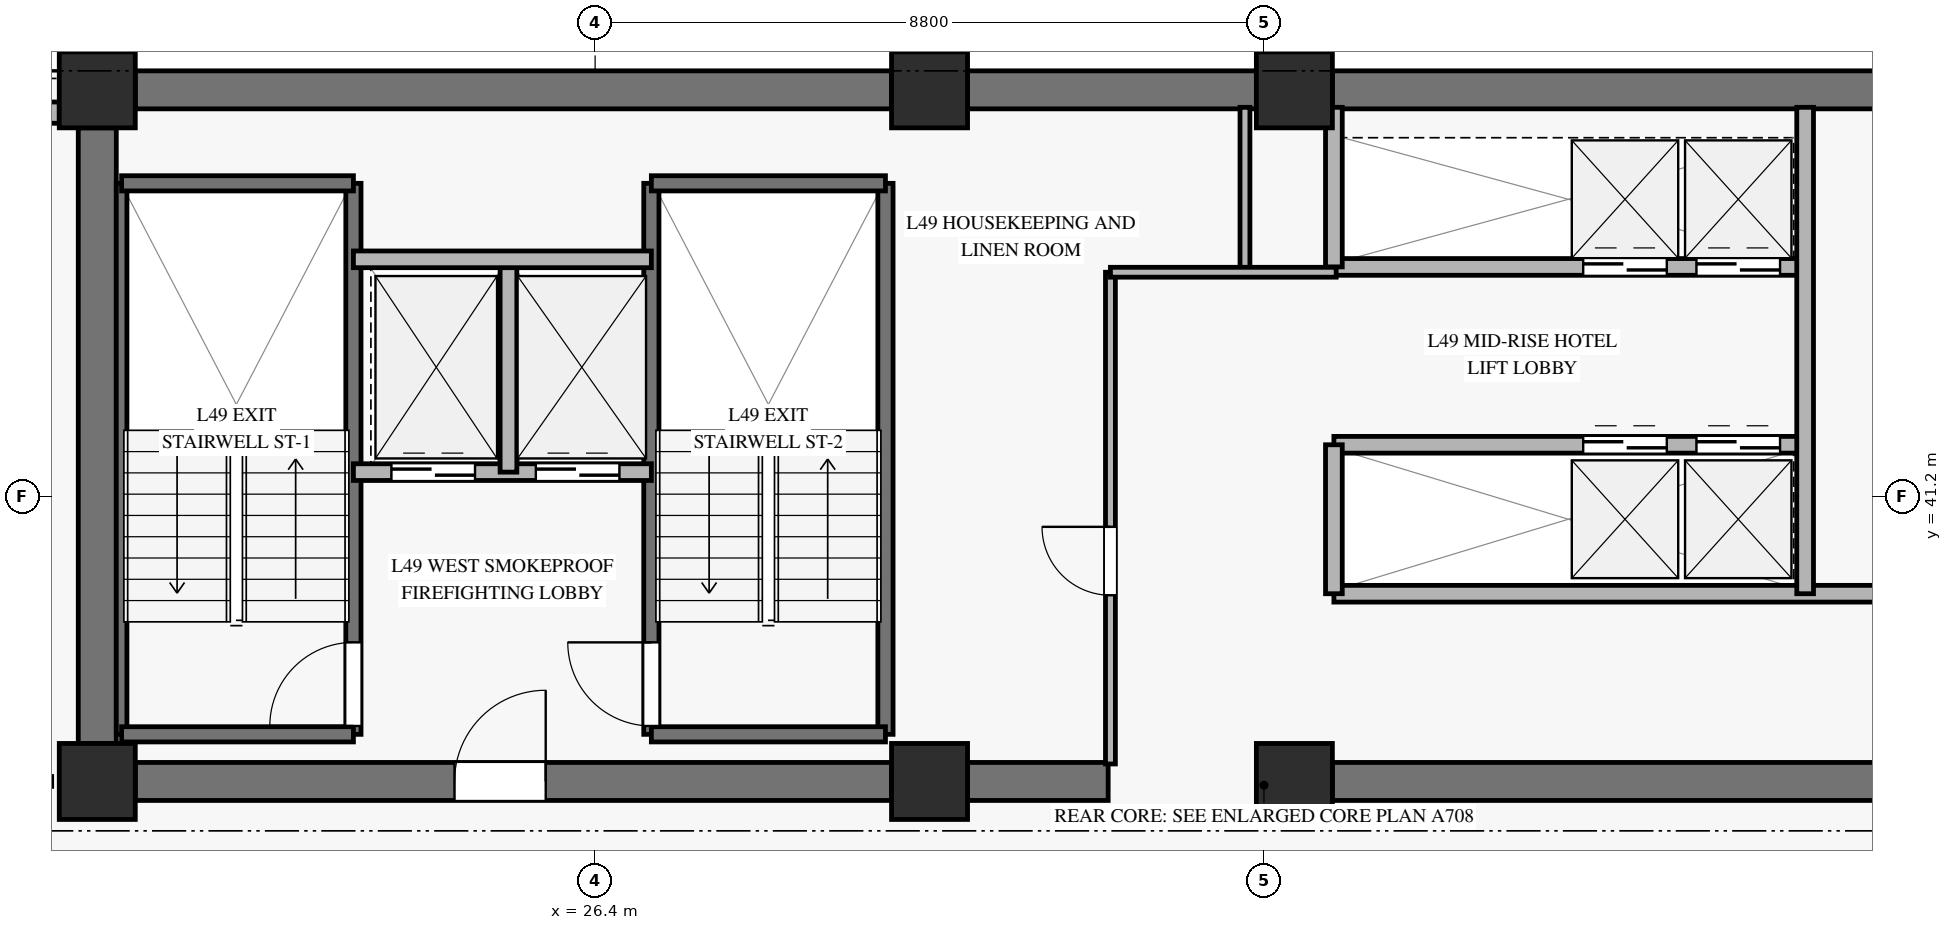
"""IFC4 building model, lengths in metres.
Left out: names, types, materials, properties, quantities, classifications, styles, units other than length and angle.
Written with IfcOpenShell. Run it as: python <this file> out.ifc"""

import sys

from ifc_helpers import new_model, si_unit, direction, frame, frame_2d, origin, origin_2d, place, context, subcontext, project, spatial, rectangle, extrude, source, transform, mapped, element, fill, save


model = new_model("IFC4")
c1 = context("Model", 3, precision=1e-05, world=origin(), true_north=direction((0.0, 1.0)))
c2 = subcontext(c1, "Body", "Model", "MODEL_VIEW")
j1 = project(units=[si_unit("LENGTHUNIT", "METRE"), si_unit("PLANEANGLEUNIT", "RADIAN")], contexts=[c1])
p1 = place(None, origin())
s1 = spatial("IfcSite", under=j1, at=p1, CompositionType="ELEMENT")
p2 = place(p1, origin())
s2 = spatial("IfcBuilding", under=s1, at=p2, CompositionType="ELEMENT")
p3 = place(p2, frame((0.0, 0.0, 195.7)))
s3 = spatial("IfcBuildingStorey", under=s2, at=p3, CompositionType="ELEMENT", Elevation=195.7)
m1 = source(origin(), c2, "Body", "SweptSolid", [
    extrude(rectangle(XDim=1.0, YDim=1.0, at=origin_2d()), origin(), (0.0, 0.0, 1.0), 3.27),
])
for number, where, z_axis, x_axis in (
    (1, (19.85, 37.45, 0.0), (0.0, 0.0, 1.0), (1.0, 0.0, 0.0)),
    (2, (19.85, 46.55, 0.0), (0.0, 0.0, 1.0), (1.0, 0.0, 0.0)),
    (3, (30.8, 37.45, 0.0), (0.0, 0.0, 1.0), (1.0, 0.0, 0.0)),
    (4, (30.8, 46.55, 0.0), (0.0, 0.0, 1.0), (1.0, 0.0, 0.0)),
    (5, (35.6, 37.45, 0.0), (0.0, 0.0, 1.0), (1.0, 0.0, 0.0)),
    (6, (35.6, 46.55, 0.0), (0.0, 0.0, 1.0), (1.0, 0.0, 0.0)),
):
    element("IfcColumn", number, at=place(p3, frame(where, z_axis=z_axis, x_axis=x_axis)), inside=s3, PredefinedType="PILASTER", context=c2, shape_type="MappedRepresentation", body=[
        mapped(m1, transform((0.0, 0.0, 0.0), x_axis=(1.0, 0.0, 0.0), y_axis=(0.0, 1.0, 0.0), z_axis=(0.0, 0.0, 1.0), scale=1.0)),
    ])
p4 = place(p3, frame((20.35, 46.55, 0.0), z_axis=(0.0, 0.0, 1.0), x_axis=(1.0, 0.0, 0.0)))
e7 = element("IfcWall", 7, at=p4, inside=s3, PredefinedType="SHEAR", context=c2, shape_type="SweptSolid", body=[
    extrude(rectangle(XDim=9.95, YDim=0.5, at=frame_2d((4.975, 0.0))), origin(), (0.0, 0.0, 1.0), 3.27),
])
p5 = place(p3, frame((31.3, 46.55, 0.0), z_axis=(0.0, 0.0, 1.0), x_axis=(1.0, 0.0, 0.0)))
e8 = element("IfcWall", 8, at=p5, inside=s3, PredefinedType="SHEAR", context=c2, shape_type="SweptSolid", body=[
    extrude(rectangle(XDim=3.8, YDim=0.5, at=frame_2d((1.9, 0.0))), origin(), (0.0, 0.0, 1.0), 3.27),
])
p6 = place(p3, frame((36.1, 46.55, 0.0), z_axis=(0.0, 0.0, 1.0), x_axis=(1.0, 0.0, 0.0)))
e9 = element("IfcWall", 9, at=p6, inside=s3, PredefinedType="SHEAR", context=c2, shape_type="SweptSolid", body=[
    extrude(rectangle(XDim=7.7, YDim=0.5, at=frame_2d((3.85, 0.0))), origin(), (0.0, 0.0, 1.0), 3.27),
])
p7 = place(p3, frame((20.35, 37.45, 0.0), z_axis=(0.0, 0.0, 1.0), x_axis=(1.0, 0.0, 0.0)))
e10 = element("IfcWall", 10, at=p7, inside=s3, PredefinedType="SHEAR", context=c2, shape_type="SweptSolid", body=[
    extrude(rectangle(XDim=9.95, YDim=0.5, at=frame_2d((4.975, 0.0))), origin(), (0.0, 0.0, 1.0), 3.27),
])
p8 = place(p7, frame((4.2, 0.0, 0.0)))
e11 = element("IfcOpeningElement", 11, at=p8, cuts=e10, PredefinedType="OPENING", context=c2, shape_type="SweptSolid", body=[
    extrude(rectangle(XDim=1.2, YDim=2.15, at=frame_2d((0.6, 1.075))), frame((0.0, 0.26, 0.0), z_axis=(0.0, -1.0, 0.0), x_axis=(1.0, 0.0, 0.0)), (0.0, 0.0, 1.0), 0.52),
])
p9 = place(p3, frame((31.3, 37.45, 0.0), z_axis=(0.0, 0.0, 1.0), x_axis=(1.0, 0.0, 0.0)))
e12 = element("IfcWall", 12, at=p9, inside=s3, PredefinedType="SHEAR", context=c2, shape_type="SweptSolid", body=[
    extrude(rectangle(XDim=1.85, YDim=0.5, at=frame_2d((0.925, 0.0))), origin(), (0.0, 0.0, 1.0), 3.27),
])
p10 = place(p3, frame((36.1, 37.45, 0.0), z_axis=(0.0, 0.0, 1.0), x_axis=(1.0, 0.0, 0.0)))
e13 = element("IfcWall", 13, at=p10, inside=s3, PredefinedType="SHEAR", context=c2, shape_type="SweptSolid", body=[
    extrude(rectangle(XDim=7.7, YDim=0.5, at=frame_2d((3.85, 0.0))), origin(), (0.0, 0.0, 1.0), 3.27),
])
p11 = place(p3, frame((19.85, 37.95, 0.0), z_axis=(0.0, 0.0, 1.0), x_axis=(0.0, 1.0, 0.0)))
e14 = element("IfcWall", 14, at=p11, inside=s3, PredefinedType="SHEAR", context=c2, shape_type="SweptSolid", body=[
    extrude(rectangle(XDim=8.1, YDim=0.5, at=frame_2d((4.05, 0.0))), origin(), (0.0, 0.0, 1.0), 3.27),
])
p12 = place(p3, frame((9.574, 46.25, 0.0), z_axis=(0.0, 0.0, 1.0), x_axis=(1.0, 0.0, 0.0)))
e15 = element("IfcWall", 15, at=p12, inside=s3, PredefinedType="SOLIDWALL", context=c2, shape_type="SweptSolid", body=[
    extrude(rectangle(XDim=9.776, YDim=0.28, at=frame_2d((4.888, 0.0))), origin(), (0.0, 0.0, 1.0), 2.75),
])
p13 = place(p12, frame((4.088, 0.0, 0.45)))
e16 = element("IfcOpeningElement", 16, at=p13, cuts=e15, PredefinedType="OPENING", context=c2, shape_type="SweptSolid", body=[
    extrude(rectangle(XDim=1.6, YDim=2.0, at=frame_2d((0.8, 1.0))), frame((0.0, 0.15, 0.0), z_axis=(0.0, -1.0, 0.0), x_axis=(1.0, 0.0, 0.0)), (0.0, 0.0, 1.0), 0.3),
])
p14 = place(p3, frame((20.17, 38.07, 0.0), z_axis=(0.0, 0.0, 1.0), x_axis=(0.0, 1.0, 0.0)))
e17 = element("IfcWall", 17, at=p14, inside=s3, PredefinedType="SOLIDWALL", context=c2, shape_type="SweptSolid", body=[
    extrude(rectangle(XDim=7.25, YDim=0.14, at=frame_2d((3.625, 0.0))), origin(), (0.0, 0.0, 1.0), 3.5),
])
p15 = place(p3, frame((23.22, 38.07, 0.0), z_axis=(0.0, 0.0, 1.0), x_axis=(0.0, 1.0, 0.0)))
e18 = element("IfcWall", 18, at=p15, inside=s3, PredefinedType="SOLIDWALL", context=c2, shape_type="SweptSolid", body=[
    extrude(rectangle(XDim=7.25, YDim=0.2, at=frame_2d((3.625, 0.0))), origin(), (0.0, 0.0, 1.0), 3.5),
])
p16 = place(p15, frame((0.11, 0.0, 0.0)))
e19 = element("IfcOpeningElement", 19, at=p16, cuts=e18, PredefinedType="OPENING", context=c2, shape_type="SweptSolid", body=[
    extrude(rectangle(XDim=1.1, YDim=2.15, at=frame_2d((0.55, 1.075))), frame((0.0, 0.11, 0.0), z_axis=(0.0, -1.0, 0.0), x_axis=(1.0, 0.0, 0.0)), (0.0, 0.0, 1.0), 0.22),
])
for number, where, z_axis, x_axis in (
    (20, (20.17, 45.32, 0.0), (0.0, 0.0, 1.0), (1.0, 0.0, 0.0)),
    (21, (20.17, 38.07, 0.0), (0.0, 0.0, 1.0), (1.0, 0.0, 0.0)),
):
    element("IfcWall", number, at=place(p3, frame(where, z_axis=z_axis, x_axis=x_axis)), inside=s3, PredefinedType="SOLIDWALL", context=c2, shape_type="SweptSolid", body=[
        extrude(rectangle(XDim=3.05, YDim=0.2, at=frame_2d((1.525, 0.0))), origin(), (0.0, 0.0, 1.0), 3.5),
    ])
p17 = place(p3, frame((27.14, 38.07, 0.0), z_axis=(0.0, 0.0, 1.0), x_axis=(0.0, 1.0, 0.0)))
e22 = element("IfcWall", 22, at=p17, inside=s3, PredefinedType="SOLIDWALL", context=c2, shape_type="SweptSolid", body=[
    extrude(rectangle(XDim=7.25, YDim=0.2, at=frame_2d((3.625, 0.0))), origin(), (0.0, 0.0, 1.0), 3.5),
])
p18 = place(p17, frame((0.11, 0.0, 0.0)))
e23 = element("IfcOpeningElement", 23, at=p18, cuts=e22, PredefinedType="OPENING", context=c2, shape_type="SweptSolid", body=[
    extrude(rectangle(XDim=1.1, YDim=2.15, at=frame_2d((0.55, 1.075))), frame((0.0, 0.11, 0.0), z_axis=(0.0, -1.0, 0.0), x_axis=(1.0, 0.0, 0.0)), (0.0, 0.0, 1.0), 0.22),
])
p19 = place(p3, frame((30.22, 38.07, 0.0), z_axis=(0.0, 0.0, 1.0), x_axis=(0.0, 1.0, 0.0)))
e24 = element("IfcWall", 24, at=p19, inside=s3, PredefinedType="SOLIDWALL", context=c2, shape_type="SweptSolid", body=[
    extrude(rectangle(XDim=7.25, YDim=0.2, at=frame_2d((3.625, 0.0))), origin(), (0.0, 0.0, 1.0), 3.5),
])
for number, where, z_axis, x_axis in (
    (25, (27.14, 45.32, 0.0), (0.0, 0.0, 1.0), (1.0, 0.0, 0.0)),
    (26, (27.14, 38.07, 0.0), (0.0, 0.0, 1.0), (1.0, 0.0, 0.0)),
):
    element("IfcWall", number, at=place(p3, frame(where, z_axis=z_axis, x_axis=x_axis)), inside=s3, PredefinedType="SOLIDWALL", context=c2, shape_type="SweptSolid", body=[
        extrude(rectangle(XDim=3.08, YDim=0.2, at=frame_2d((1.54, 0.0))), origin(), (0.0, 0.0, 1.0), 3.5),
    ])
p20 = place(p3, frame((23.22, 41.52, 0.0), z_axis=(0.0, 0.0, 1.0), x_axis=(1.0, 0.0, 0.0)))
e27 = element("IfcWall", 27, at=p20, inside=s3, PredefinedType="SOLIDWALL", context=c2, shape_type="SweptSolid", body=[
    extrude(rectangle(XDim=3.92, YDim=0.22, at=frame_2d((1.96, 0.0))), origin(), (0.0, 0.0, 1.0), 3.27),
])
p21 = place(p20, frame((0.5, 0.0, 0.0)))
e28 = element("IfcOpeningElement", 28, at=p21, cuts=e27, PredefinedType="OPENING", context=c2, shape_type="SweptSolid", body=[
    extrude(rectangle(XDim=1.1, YDim=2.2, at=frame_2d((0.55, 1.1))), frame((0.0, 0.12, 0.0), z_axis=(0.0, -1.0, 0.0), x_axis=(1.0, 0.0, 0.0)), (0.0, 0.0, 1.0), 0.24),
])
p22 = place(p20, frame((2.4, 0.0, 0.0)))
e29 = element("IfcOpeningElement", 29, at=p22, cuts=e27, PredefinedType="OPENING", context=c2, shape_type="SweptSolid", body=[
    extrude(rectangle(XDim=1.1, YDim=2.2, at=frame_2d((0.55, 1.1))), frame((0.0, 0.12, 0.0), z_axis=(0.0, -1.0, 0.0), x_axis=(1.0, 0.0, 0.0)), (0.0, 0.0, 1.0), 0.24),
])
p23 = place(p3, frame((25.26, 41.52, 0.0), z_axis=(0.0, 0.0, 1.0), x_axis=(0.0, 1.0, 0.0)))
e30 = element("IfcWall", 30, at=p23, inside=s3, PredefinedType="SOLIDWALL", context=c2, shape_type="SweptSolid", body=[
    extrude(rectangle(XDim=2.8, YDim=0.22, at=frame_2d((1.4, 0.0))), origin(), (0.0, 0.0, 1.0), 3.27),
])
p24 = place(p3, frame((23.22, 44.32, 0.0), z_axis=(0.0, 0.0, 1.0), x_axis=(1.0, 0.0, 0.0)))
e31 = element("IfcWall", 31, at=p24, inside=s3, PredefinedType="SOLIDWALL", context=c2, shape_type="SweptSolid", body=[
    extrude(rectangle(XDim=3.92, YDim=0.22, at=frame_2d((1.96, 0.0))), origin(), (0.0, 0.0, 1.0), 3.27),
])
p25 = place(p3, frame((36.12, 44.22, 0.0), z_axis=(0.0, 0.0, 1.0), x_axis=(1.0, 0.0, 0.0)))
e32 = element("IfcWall", 32, at=p25, inside=s3, PredefinedType="SOLIDWALL", context=c2, shape_type="SweptSolid", body=[
    extrude(rectangle(XDim=6.2, YDim=0.22, at=frame_2d((3.1, 0.0))), origin(), (0.0, 0.0, 1.0), 3.27),
])
p26 = place(p25, frame((3.28, 0.0, 0.0)))
e33 = element("IfcOpeningElement", 33, at=p26, cuts=e32, PredefinedType="OPENING", context=c2, shape_type="SweptSolid", body=[
    extrude(rectangle(XDim=1.1, YDim=2.2, at=frame_2d((0.55, 1.1))), frame((0.0, 0.12, 0.0), z_axis=(0.0, -1.0, 0.0), x_axis=(1.0, 0.0, 0.0)), (0.0, 0.0, 1.0), 0.24),
])
p27 = place(p25, frame((4.77, 0.0, 0.0)))
e34 = element("IfcOpeningElement", 34, at=p27, cuts=e32, PredefinedType="OPENING", context=c2, shape_type="SweptSolid", body=[
    extrude(rectangle(XDim=1.1, YDim=2.2, at=frame_2d((0.55, 1.1))), frame((0.0, 0.12, 0.0), z_axis=(0.0, -1.0, 0.0), x_axis=(1.0, 0.0, 0.0)), (0.0, 0.0, 1.0), 0.24),
])
p28 = place(p3, frame((36.12, 41.88, 0.0), z_axis=(0.0, 0.0, 1.0), x_axis=(1.0, 0.0, 0.0)))
e35 = element("IfcWall", 35, at=p28, inside=s3, PredefinedType="SOLIDWALL", context=c2, shape_type="SweptSolid", body=[
    extrude(rectangle(XDim=6.2, YDim=0.22, at=frame_2d((3.1, 0.0))), origin(), (0.0, 0.0, 1.0), 3.27),
])
p29 = place(p28, frame((3.28, 0.0, 0.0)))
e36 = element("IfcOpeningElement", 36, at=p29, cuts=e35, PredefinedType="OPENING", context=c2, shape_type="SweptSolid", body=[
    extrude(rectangle(XDim=1.1, YDim=2.2, at=frame_2d((0.55, 1.1))), frame((0.0, 0.12, 0.0), z_axis=(0.0, -1.0, 0.0), x_axis=(1.0, 0.0, 0.0)), (0.0, 0.0, 1.0), 0.24),
])
p30 = place(p28, frame((4.77, 0.0, 0.0)))
e37 = element("IfcOpeningElement", 37, at=p30, cuts=e35, PredefinedType="OPENING", context=c2, shape_type="SweptSolid", body=[
    extrude(rectangle(XDim=1.1, YDim=2.2, at=frame_2d((0.55, 1.1))), frame((0.0, 0.12, 0.0), z_axis=(0.0, -1.0, 0.0), x_axis=(1.0, 0.0, 0.0)), (0.0, 0.0, 1.0), 0.24),
])
p31 = place(p3, frame((36.12, 39.92, 0.0), z_axis=(0.0, 0.0, 1.0), x_axis=(1.0, 0.0, 0.0)))
e38 = element("IfcWall", 38, at=p31, inside=s3, PredefinedType="SOLIDWALL", context=c2, shape_type="SweptSolid", body=[
    extrude(rectangle(XDim=8.6, YDim=0.22, at=frame_2d((4.3, 0.0))), origin(), (0.0, 0.0, 1.0), 2.555),
])
p32 = place(p3, frame((42.32, 39.92, 0.0), z_axis=(0.0, 0.0, 1.0), x_axis=(0.0, 1.0, 0.0)))
e39 = element("IfcWall", 39, at=p32, inside=s3, PredefinedType="SOLIDWALL", context=c2, shape_type="SweptSolid", body=[
    extrude(rectangle(XDim=6.4, YDim=0.22, at=frame_2d((3.2, 0.0))), origin(), (0.0, 0.0, 1.0), 3.27),
])
p33 = place(p3, frame((36.12, 39.92, 0.0), z_axis=(0.0, 0.0, 1.0), x_axis=(0.0, 1.0, 0.0)))
e40 = element("IfcWall", 40, at=p33, inside=s3, PredefinedType="SOLIDWALL", context=c2, shape_type="SweptSolid", body=[
    extrude(rectangle(XDim=1.96, YDim=0.22, at=frame_2d((0.98, 0.0))), origin(), (0.0, 0.0, 1.0), 3.27),
])
p34 = place(p3, frame((36.12, 44.22, 0.0), z_axis=(0.0, 0.0, 1.0), x_axis=(0.0, 1.0, 0.0)))
e41 = element("IfcWall", 41, at=p34, inside=s3, PredefinedType="SOLIDWALL", context=c2, shape_type="SweptSolid", body=[
    extrude(rectangle(XDim=2.1, YDim=0.22, at=frame_2d((1.05, 0.0))), origin(), (0.0, 0.0, 1.0), 3.27),
])
p35 = place(p3, frame((33.18, 37.68, 0.0), z_axis=(0.0, 0.0, 1.0), x_axis=(0.0, 1.0, 0.0)))
e42 = element("IfcWall", 42, at=p35, inside=s3, PredefinedType="PARTITIONING", context=c2, shape_type="SweptSolid", body=[
    extrude(rectangle(XDim=6.47, YDim=0.13, at=frame_2d((3.235, 0.0))), origin(), (0.0, 0.0, 1.0), 2.355),
])
p36 = place(p35, frame((2.22, 0.0, 0.0)))
e43 = element("IfcOpeningElement", 43, at=p36, cuts=e42, PredefinedType="OPENING", context=c2, shape_type="SweptSolid", body=[
    extrude(rectangle(XDim=0.9, YDim=2.1, at=frame_2d((0.45, 1.05))), frame((0.0, 0.075, 0.0), z_axis=(0.0, -1.0, 0.0), x_axis=(1.0, 0.0, 0.0)), (0.0, 0.0, 1.0), 0.15),
])
p37 = place(p3, frame((34.95, 44.15, 0.0), z_axis=(0.0, 0.0, 1.0), x_axis=(0.0, 1.0, 0.0)))
e44 = element("IfcWall", 44, at=p37, inside=s3, PredefinedType="PARTITIONING", context=c2, shape_type="SweptSolid", body=[
    extrude(rectangle(XDim=2.17, YDim=0.13, at=frame_2d((1.085, 0.0))), origin(), (0.0, 0.0, 1.0), 3.27),
])
p38 = place(p3, frame((33.18, 44.15, 0.0), z_axis=(0.0, 0.0, 1.0), x_axis=(1.0, 0.0, 0.0)))
e45 = element("IfcWall", 45, at=p38, inside=s3, PredefinedType="PARTITIONING", context=c2, shape_type="SweptSolid", body=[
    extrude(rectangle(XDim=2.97, YDim=0.13, at=frame_2d((1.485, 0.0))), origin(), (0.0, 0.0, 1.0), 2.555),
])
p39 = place(p3, frame((6.389, 37.45, 0.0), z_axis=(0.0, 0.0, 1.0), x_axis=(1.0, 0.0, 0.0)))
e46 = element("IfcWall", 46, at=p39, inside=s3, PredefinedType="PARTITIONING", context=c2, shape_type="SweptSolid", body=[
    extrude(rectangle(XDim=12.861, YDim=0.13, at=frame_2d((6.431, 0.0))), origin(), (0.0, 0.0, 1.0), 2.755),
])
p40 = place(p39, frame((0.9, 0.0, 0.0)))
e47 = element("IfcOpeningElement", 47, at=p40, cuts=e46, PredefinedType="OPENING", context=c2, shape_type="SweptSolid", body=[
    extrude(rectangle(XDim=0.95, YDim=2.1, at=frame_2d((0.475, 1.05))), frame((0.0, 0.075, 0.0), z_axis=(0.0, -1.0, 0.0), x_axis=(1.0, 0.0, 0.0)), (0.0, 0.0, 1.0), 0.15),
])
p41 = place(p39, frame((5.021, 0.0, 0.0)))
e48 = element("IfcOpeningElement", 48, at=p41, cuts=e46, PredefinedType="OPENING", context=c2, shape_type="SweptSolid", body=[
    extrude(rectangle(XDim=0.9, YDim=2.1, at=frame_2d((0.45, 1.05))), frame((0.0, 0.075, 0.0), z_axis=(0.0, -1.0, 0.0), x_axis=(1.0, 0.0, 0.0)), (0.0, 0.0, 1.0), 0.15),
])
m2 = source(origin(), c2, "Body", "SweptSolid", [
    extrude(rectangle(XDim=1.1, YDim=2.15, at=frame_2d((0.55, 1.075))), frame((0.0, 0.025, 0.0), z_axis=(0.0, -1.0, 0.0), x_axis=(1.0, 0.0, 0.0)), (0.0, 0.0, 1.0), 0.05),
])
p42 = place(p16, origin())
e49 = element("IfcDoor", 49, at=p42, inside=s3, OperationType="SINGLE_SWING_LEFT", PredefinedType="DOOR", context=c2, shape_type="MappedRepresentation", body=[
    mapped(m2, transform((0.0, 0.0, 0.0), x_axis=(1.0, 0.0, 0.0), y_axis=(0.0, 1.0, 0.0), z_axis=(0.0, 0.0, 1.0), scale=1.0)),
])
fill(e19, e49)
p43 = place(p18, origin())
e50 = element("IfcDoor", 50, at=p43, inside=s3, OperationType="SINGLE_SWING_RIGHT", PredefinedType="DOOR", context=c2, shape_type="MappedRepresentation", body=[
    mapped(m2, transform((0.0, 0.0, 0.0), x_axis=(1.0, 0.0, 0.0), y_axis=(0.0, 1.0, 0.0), z_axis=(0.0, 0.0, 1.0), scale=1.0)),
])
fill(e23, e50)
m3 = source(origin(), c2, "Body", "SweptSolid", [
    extrude(rectangle(XDim=1.1, YDim=2.2, at=frame_2d((0.55, 1.1))), frame((0.0, 0.025, 0.0), z_axis=(0.0, -1.0, 0.0), x_axis=(1.0, 0.0, 0.0)), (0.0, 0.0, 1.0), 0.05),
])
p44 = place(p21, origin())
e51 = element("IfcDoor", 51, at=p44, inside=s3, OperationType="SLIDING_TO_LEFT", PredefinedType="DOOR", context=c2, shape_type="MappedRepresentation", body=[
    mapped(m3, transform((0.0, 0.0, 0.0), x_axis=(1.0, 0.0, 0.0), y_axis=(0.0, 1.0, 0.0), z_axis=(0.0, 0.0, 1.0), scale=1.0)),
])
fill(e28, e51)
p45 = place(p22, origin())
e52 = element("IfcDoor", 52, at=p45, inside=s3, OperationType="SLIDING_TO_LEFT", PredefinedType="DOOR", context=c2, shape_type="MappedRepresentation", body=[
    mapped(m3, transform((0.0, 0.0, 0.0), x_axis=(1.0, 0.0, 0.0), y_axis=(0.0, 1.0, 0.0), z_axis=(0.0, 0.0, 1.0), scale=1.0)),
])
fill(e29, e52)
m4 = source(origin(), c2, "Body", "SweptSolid", [
    extrude(rectangle(XDim=1.2, YDim=2.15, at=frame_2d((0.6, 1.075))), frame((0.0, 0.025, 0.0), z_axis=(0.0, -1.0, 0.0), x_axis=(1.0, 0.0, 0.0)), (0.0, 0.0, 1.0), 0.05),
])
p46 = place(p8, origin())
e53 = element("IfcDoor", 53, at=p46, inside=s3, OperationType="SINGLE_SWING_RIGHT", PredefinedType="DOOR", context=c2, shape_type="MappedRepresentation", body=[
    mapped(m4, transform((0.0, 0.0, 0.0), x_axis=(1.0, 0.0, 0.0), y_axis=(0.0, 1.0, 0.0), z_axis=(0.0, 0.0, 1.0), scale=1.0)),
])
fill(e11, e53)
p47 = place(p26, origin())
e54 = element("IfcDoor", 54, at=p47, inside=s3, OperationType="SLIDING_TO_LEFT", PredefinedType="DOOR", context=c2, shape_type="MappedRepresentation", body=[
    mapped(m3, transform((0.0, 0.0, 0.0), x_axis=(1.0, 0.0, 0.0), y_axis=(0.0, 1.0, 0.0), z_axis=(0.0, 0.0, 1.0), scale=1.0)),
])
fill(e33, e54)
p48 = place(p27, origin())
e55 = element("IfcDoor", 55, at=p48, inside=s3, OperationType="SLIDING_TO_LEFT", PredefinedType="DOOR", context=c2, shape_type="MappedRepresentation", body=[
    mapped(m3, transform((0.0, 0.0, 0.0), x_axis=(1.0, 0.0, 0.0), y_axis=(0.0, 1.0, 0.0), z_axis=(0.0, 0.0, 1.0), scale=1.0)),
])
fill(e34, e55)
p49 = place(p29, origin())
e56 = element("IfcDoor", 56, at=p49, inside=s3, OperationType="SLIDING_TO_LEFT", PredefinedType="DOOR", context=c2, shape_type="MappedRepresentation", body=[
    mapped(m3, transform((0.0, 0.0, 0.0), x_axis=(1.0, 0.0, 0.0), y_axis=(0.0, 1.0, 0.0), z_axis=(0.0, 0.0, 1.0), scale=1.0)),
])
fill(e36, e56)
p50 = place(p30, origin())
e57 = element("IfcDoor", 57, at=p50, inside=s3, OperationType="SLIDING_TO_LEFT", PredefinedType="DOOR", context=c2, shape_type="MappedRepresentation", body=[
    mapped(m3, transform((0.0, 0.0, 0.0), x_axis=(1.0, 0.0, 0.0), y_axis=(0.0, 1.0, 0.0), z_axis=(0.0, 0.0, 1.0), scale=1.0)),
])
fill(e37, e57)
m5 = source(origin(), c2, "Body", "SweptSolid", [
    extrude(rectangle(XDim=0.9, YDim=2.1, at=frame_2d((0.45, 1.05))), frame((0.0, 0.025, 0.0), z_axis=(0.0, -1.0, 0.0), x_axis=(1.0, 0.0, 0.0)), (0.0, 0.0, 1.0), 0.05),
])
p51 = place(p36, origin())
e58 = element("IfcDoor", 58, at=p51, inside=s3, OperationType="SINGLE_SWING_RIGHT", PredefinedType="DOOR", context=c2, shape_type="MappedRepresentation", body=[
    mapped(m5, transform((0.0, 0.0, 0.0), x_axis=(1.0, 0.0, 0.0), y_axis=(0.0, 1.0, 0.0), z_axis=(0.0, 0.0, 1.0), scale=1.0)),
])
fill(e43, e58)
save(model, sys.argv[1])
